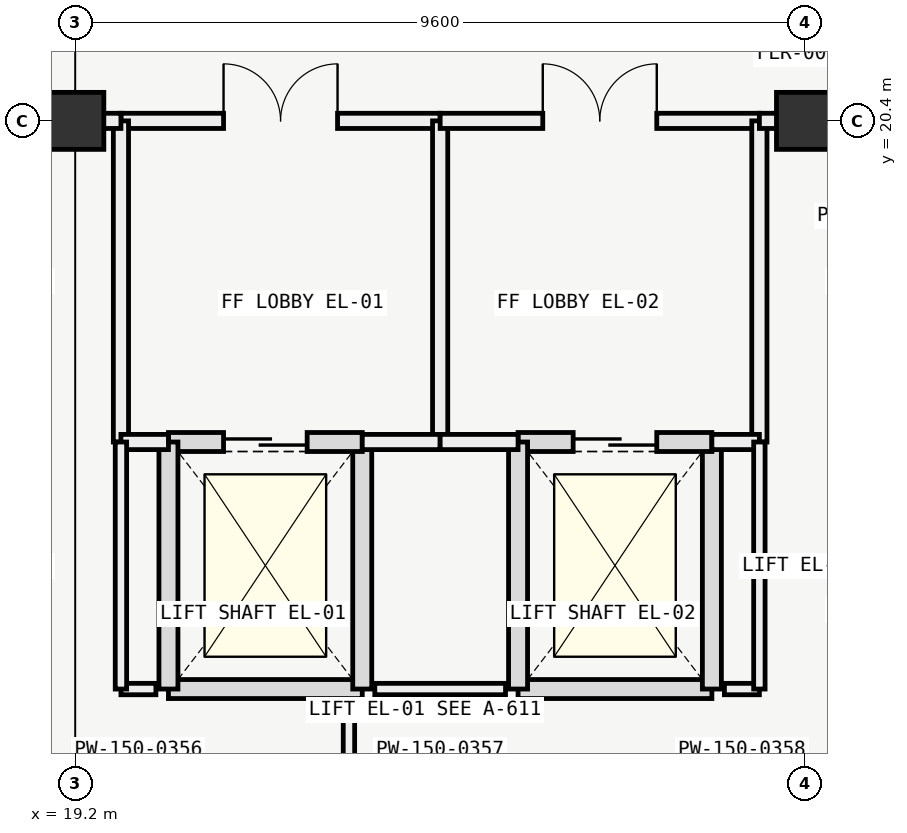
"""IFC4 building model, lengths in metres.
Left out: names, types, materials, properties, quantities, classifications, styles, units other than length and angle.
Written with IfcOpenShell. Run it as: python <this file> out.ifc"""

import sys

from ifc_helpers import new_model, si_unit, direction, frame, frame_2d, origin, origin_2d, place, context, subcontext, project, spatial, rectangle, extrude, element, fill, save


model = new_model("IFC4")
c1 = context("Model", 3, precision=1e-05, world=origin(), true_north=direction((0.0, 1.0)))
c2 = subcontext(c1, "Body", "Model", "MODEL_VIEW")
j1 = project(units=[si_unit("LENGTHUNIT", "METRE"), si_unit("PLANEANGLEUNIT", "RADIAN")], contexts=[c1])
p1 = place(None, origin())
s1 = spatial("IfcSite", under=j1, at=p1, CompositionType="ELEMENT")
p2 = place(p1, origin())
s2 = spatial("IfcBuilding", under=s1, at=p2, CompositionType="ELEMENT")
p3 = place(p2, frame((0.0, 0.0, 5.4)))
s3 = spatial("IfcBuildingStorey", under=s2, at=p3, CompositionType="ELEMENT", Elevation=5.4)
for number, where, z_axis, x_axis in (
    (1, (19.2, 20.4, 0.0), (0.0, 0.0, 1.0), (1.0, 0.0, 0.0)),
    (2, (28.8, 20.4, 0.0), (0.0, 0.0, 1.0), (1.0, 0.0, 0.0)),
):
    element("IfcColumn", number, at=place(p3, frame(where, z_axis=z_axis, x_axis=x_axis)), inside=s3, PredefinedType="COLUMN", context=c2, shape_type="SweptSolid", body=[
        extrude(rectangle(XDim=0.75, YDim=0.75, at=origin_2d()), origin(), (0.0, 0.0, 1.0), 4.2),
    ])
p4 = place(p3, frame((20.425, 12.925, 0.0), z_axis=(0.0, 0.0, 1.0), x_axis=(1.0, 0.0, 0.0)))
e3 = element("IfcWall", 3, at=p4, inside=s3, PredefinedType="SOLIDWALL", context=c2, shape_type="SweptSolid", body=[
    extrude(rectangle(XDim=2.55, YDim=0.25, at=frame_2d((1.275, 0.0))), origin(), (0.0, 0.0, 1.0), 3.92),
])
p5 = place(p3, frame((22.975, 12.925, 0.0), z_axis=(0.0, 0.0, 1.0), x_axis=(0.0, 1.0, 0.0)))
e4 = element("IfcWall", 4, at=p5, inside=s3, PredefinedType="SOLIDWALL", context=c2, shape_type="SweptSolid", body=[
    extrude(rectangle(XDim=3.25, YDim=0.25, at=frame_2d((1.625, 0.0))), origin(), (0.0, 0.0, 1.0), 3.92),
])
p6 = place(p3, frame((22.975, 16.175, 0.0), z_axis=(0.0, 0.0, 1.0), x_axis=(-1.0, 0.0, 0.0)))
e5 = element("IfcWall", 5, at=p6, inside=s3, PredefinedType="SOLIDWALL", context=c2, shape_type="SweptSolid", body=[
    extrude(rectangle(XDim=2.55, YDim=0.25, at=frame_2d((1.275, 0.0))), origin(), (0.0, 0.0, 1.0), 3.92),
])
p7 = place(p6, frame((0.725, 0.0, 0.0)))
e6 = element("IfcOpeningElement", 6, at=p7, cuts=e5, PredefinedType="OPENING", context=c2, shape_type="SweptSolid", body=[
    extrude(rectangle(XDim=1.1, YDim=2.1, at=frame_2d((0.55, 1.05))), frame((0.0, 0.135, 0.0), z_axis=(0.0, -1.0, 0.0), x_axis=(1.0, 0.0, 0.0)), (0.0, 0.0, 1.0), 0.27),
])
p8 = place(p3, frame((20.425, 16.175, 0.0), z_axis=(0.0, 0.0, 1.0), x_axis=(0.0, -1.0, 0.0)))
e7 = element("IfcWall", 7, at=p8, inside=s3, PredefinedType="SOLIDWALL", context=c2, shape_type="SweptSolid", body=[
    extrude(rectangle(XDim=3.25, YDim=0.25, at=frame_2d((1.625, 0.0))), origin(), (0.0, 0.0, 1.0), 3.92),
])
p9 = place(p3, frame((19.8, 20.4, 0.0), z_axis=(0.0, 0.0, 1.0), x_axis=(1.0, 0.0, 0.0)))
e8 = element("IfcWall", 8, at=p9, inside=s3, PredefinedType="PARTITIONING", context=c2, shape_type="SweptSolid", body=[
    extrude(rectangle(XDim=4.2, YDim=0.2, at=frame_2d((2.1, 0.0))), origin(), (0.0, 0.0, 1.0), 3.2),
])
p10 = place(p9, frame((1.35, 0.0, 0.0)))
e9 = element("IfcOpeningElement", 9, at=p10, cuts=e8, PredefinedType="OPENING", context=c2, shape_type="SweptSolid", body=[
    extrude(rectangle(XDim=1.5, YDim=2.2, at=frame_2d((0.75, 1.1))), frame((0.0, 0.11, 0.0), z_axis=(0.0, -1.0, 0.0), x_axis=(1.0, 0.0, 0.0)), (0.0, 0.0, 1.0), 0.22),
])
for number, where, z_axis, x_axis in (
    (10, (19.8, 16.175, 0.0), (0.0, 0.0, 1.0), (0.0, 1.0, 0.0)),
    (11, (24.0, 16.175, 0.0), (0.0, 0.0, 1.0), (0.0, 1.0, 0.0)),
):
    element("IfcWall", number, at=place(p3, frame(where, z_axis=z_axis, x_axis=x_axis)), inside=s3, PredefinedType="PARTITIONING", context=c2, shape_type="SweptSolid", body=[
        extrude(rectangle(XDim=4.225, YDim=0.2, at=frame_2d((2.112, 0.0))), origin(), (0.0, 0.0, 1.0), 3.2),
    ])
p11 = place(p3, frame((19.8, 16.175, 0.0), z_axis=(0.0, 0.0, 1.0), x_axis=(1.0, 0.0, 0.0)))
e12 = element("IfcWall", 12, at=p11, inside=s3, PredefinedType="PARTITIONING", context=c2, shape_type="SweptSolid", body=[
    extrude(rectangle(XDim=0.625, YDim=0.2, at=frame_2d((0.312, 0.0))), origin(), (0.0, 0.0, 1.0), 3.55),
])
p12 = place(p3, frame((22.975, 16.175, 0.0), z_axis=(0.0, 0.0, 1.0), x_axis=(1.0, 0.0, 0.0)))
e13 = element("IfcWall", 13, at=p12, inside=s3, PredefinedType="PARTITIONING", context=c2, shape_type="SweptSolid", body=[
    extrude(rectangle(XDim=1.025, YDim=0.2, at=frame_2d((0.512, 0.0))), origin(), (0.0, 0.0, 1.0), 3.55),
])
p13 = place(p3, frame((25.025, 12.925, 0.0), z_axis=(0.0, 0.0, 1.0), x_axis=(1.0, 0.0, 0.0)))
e14 = element("IfcWall", 14, at=p13, inside=s3, PredefinedType="SOLIDWALL", context=c2, shape_type="SweptSolid", body=[
    extrude(rectangle(XDim=2.55, YDim=0.25, at=frame_2d((1.275, 0.0))), origin(), (0.0, 0.0, 1.0), 3.92),
])
p14 = place(p3, frame((27.575, 12.925, 0.0), z_axis=(0.0, 0.0, 1.0), x_axis=(0.0, 1.0, 0.0)))
e15 = element("IfcWall", 15, at=p14, inside=s3, PredefinedType="SOLIDWALL", context=c2, shape_type="SweptSolid", body=[
    extrude(rectangle(XDim=3.25, YDim=0.25, at=frame_2d((1.625, 0.0))), origin(), (0.0, 0.0, 1.0), 3.92),
])
p15 = place(p3, frame((27.575, 16.175, 0.0), z_axis=(0.0, 0.0, 1.0), x_axis=(-1.0, 0.0, 0.0)))
e16 = element("IfcWall", 16, at=p15, inside=s3, PredefinedType="SOLIDWALL", context=c2, shape_type="SweptSolid", body=[
    extrude(rectangle(XDim=2.55, YDim=0.25, at=frame_2d((1.275, 0.0))), origin(), (0.0, 0.0, 1.0), 3.92),
])
p16 = place(p15, frame((0.725, 0.0, 0.0)))
e17 = element("IfcOpeningElement", 17, at=p16, cuts=e16, PredefinedType="OPENING", context=c2, shape_type="SweptSolid", body=[
    extrude(rectangle(XDim=1.1, YDim=2.1, at=frame_2d((0.55, 1.05))), frame((0.0, 0.135, 0.0), z_axis=(0.0, -1.0, 0.0), x_axis=(1.0, 0.0, 0.0)), (0.0, 0.0, 1.0), 0.27),
])
p17 = place(p3, frame((25.025, 16.175, 0.0), z_axis=(0.0, 0.0, 1.0), x_axis=(0.0, -1.0, 0.0)))
e18 = element("IfcWall", 18, at=p17, inside=s3, PredefinedType="SOLIDWALL", context=c2, shape_type="SweptSolid", body=[
    extrude(rectangle(XDim=3.25, YDim=0.25, at=frame_2d((1.625, 0.0))), origin(), (0.0, 0.0, 1.0), 3.92),
])
p18 = place(p3, frame((24.0, 20.4, 0.0), z_axis=(0.0, 0.0, 1.0), x_axis=(1.0, 0.0, 0.0)))
e19 = element("IfcWall", 19, at=p18, inside=s3, PredefinedType="PARTITIONING", context=c2, shape_type="SweptSolid", body=[
    extrude(rectangle(XDim=4.2, YDim=0.2, at=frame_2d((2.1, 0.0))), origin(), (0.0, 0.0, 1.0), 3.2),
])
p19 = place(p18, frame((1.35, 0.0, 0.0)))
e20 = element("IfcOpeningElement", 20, at=p19, cuts=e19, PredefinedType="OPENING", context=c2, shape_type="SweptSolid", body=[
    extrude(rectangle(XDim=1.5, YDim=2.2, at=frame_2d((0.75, 1.1))), frame((0.0, 0.11, 0.0), z_axis=(0.0, -1.0, 0.0), x_axis=(1.0, 0.0, 0.0)), (0.0, 0.0, 1.0), 0.22),
])
p20 = place(p3, frame((28.2, 16.175, 0.0), z_axis=(0.0, 0.0, 1.0), x_axis=(0.0, 1.0, 0.0)))
e21 = element("IfcWall", 21, at=p20, inside=s3, PredefinedType="PARTITIONING", context=c2, shape_type="SweptSolid", body=[
    extrude(rectangle(XDim=4.225, YDim=0.2, at=frame_2d((2.112, 0.0))), origin(), (0.0, 0.0, 1.0), 3.2),
])
p21 = place(p3, frame((24.0, 16.175, 0.0), z_axis=(0.0, 0.0, 1.0), x_axis=(1.0, 0.0, 0.0)))
e22 = element("IfcWall", 22, at=p21, inside=s3, PredefinedType="PARTITIONING", context=c2, shape_type="SweptSolid", body=[
    extrude(rectangle(XDim=1.025, YDim=0.2, at=frame_2d((0.512, 0.0))), origin(), (0.0, 0.0, 1.0), 3.55),
])
p22 = place(p3, frame((27.575, 16.175, 0.0), z_axis=(0.0, 0.0, 1.0), x_axis=(1.0, 0.0, 0.0)))
e23 = element("IfcWall", 23, at=p22, inside=s3, PredefinedType="PARTITIONING", context=c2, shape_type="SweptSolid", body=[
    extrude(rectangle(XDim=0.625, YDim=0.2, at=frame_2d((0.312, 0.0))), origin(), (0.0, 0.0, 1.0), 3.55),
])
p23 = place(p3, frame((19.8, 12.925, 0.0), z_axis=(0.0, 0.0, 1.0), x_axis=(1.0, 0.0, 0.0)))
e24 = element("IfcWall", 24, at=p23, inside=s3, PredefinedType="PARTITIONING", context=c2, shape_type="SweptSolid", body=[
    extrude(rectangle(XDim=0.46, YDim=0.15, at=frame_2d((0.23, 0.0))), origin(), (0.0, 0.0, 1.0), 3.85),
])
p24 = place(p3, frame((23.14, 12.925, 0.0), z_axis=(0.0, 0.0, 1.0), x_axis=(1.0, 0.0, 0.0)))
e25 = element("IfcWall", 25, at=p24, inside=s3, PredefinedType="PARTITIONING", context=c2, shape_type="SweptSolid", body=[
    extrude(rectangle(XDim=1.72, YDim=0.15, at=frame_2d((0.86, 0.0))), origin(), (0.0, 0.0, 1.0), 3.85),
])
p25 = place(p3, frame((27.74, 12.925, 0.0), z_axis=(0.0, 0.0, 1.0), x_axis=(1.0, 0.0, 0.0)))
e26 = element("IfcWall", 26, at=p25, inside=s3, PredefinedType="PARTITIONING", context=c2, shape_type="SweptSolid", body=[
    extrude(rectangle(XDim=0.46, YDim=0.15, at=frame_2d((0.23, 0.0))), origin(), (0.0, 0.0, 1.0), 3.85),
])
p26 = place(p3, frame((19.8, 12.925, 0.0), z_axis=(0.0, 0.0, 1.0), x_axis=(0.0, 1.0, 0.0)))
e27 = element("IfcWall", 27, at=p26, inside=s3, PredefinedType="PARTITIONING", context=c2, shape_type="SweptSolid", body=[
    extrude(rectangle(XDim=3.25, YDim=0.15, at=frame_2d((1.625, 0.0))), origin(), (0.0, 0.0, 1.0), 3.85),
])
p27 = place(p3, frame((16.89, 20.4, 0.0), z_axis=(0.0, 0.0, 1.0), x_axis=(1.0, 0.0, 0.0)))
e28 = element("IfcWall", 28, at=p27, inside=s3, PredefinedType="PARTITIONING", context=c2, shape_type="SweptSolid", body=[
    extrude(rectangle(XDim=2.91, YDim=0.2, at=frame_2d((1.455, 0.0))), origin(), (0.0, 0.0, 1.0), 3.2),
])
p28 = place(p27, frame((0.885, 0.0, 0.0)))
e29 = element("IfcOpeningElement", 29, at=p28, cuts=e28, PredefinedType="OPENING", context=c2, shape_type="SweptSolid", body=[
    extrude(rectangle(XDim=0.95, YDim=2.1, at=frame_2d((0.475, 1.05))), frame((0.0, 0.11, 0.0), z_axis=(0.0, -1.0, 0.0), x_axis=(1.0, 0.0, 0.0)), (0.0, 0.0, 1.0), 0.22),
])
p29 = place(p3, frame((22.8, 0.15, 0.0), z_axis=(0.0, 0.0, 1.0), x_axis=(0.0, 1.0, 0.0)))
e30 = element("IfcWall", 30, at=p29, inside=s3, PredefinedType="PARTITIONING", context=c2, shape_type="SweptSolid", body=[
    extrude(rectangle(XDim=12.61, YDim=0.15, at=frame_2d((6.305, 0.0))), origin(), (0.0, 0.0, 1.0), 3.2),
])
p30 = place(p3, frame((28.2, 12.925, 0.0), z_axis=(0.0, 0.0, 1.0), x_axis=(0.0, 1.0, 0.0)))
e31 = element("IfcWall", 31, at=p30, inside=s3, PredefinedType="PARTITIONING", context=c2, shape_type="SweptSolid", body=[
    extrude(rectangle(XDim=3.25, YDim=0.15, at=frame_2d((1.625, 0.0))), origin(), (0.0, 0.0, 1.0), 3.85),
])
p31 = place(p3, frame((28.2, 20.4, 0.0), z_axis=(0.0, 0.0, 1.0), x_axis=(1.0, 0.0, 0.0)))
e32 = element("IfcWall", 32, at=p31, inside=s3, PredefinedType="PARTITIONING", context=c2, shape_type="SweptSolid", body=[
    extrude(rectangle(XDim=3.11, YDim=0.2, at=frame_2d((1.555, 0.0))), origin(), (0.0, 0.0, 1.0), 3.2),
])
p32 = place(p31, frame((2.0, 0.0, 0.0)))
e33 = element("IfcOpeningElement", 33, at=p32, cuts=e32, PredefinedType="OPENING", context=c2, shape_type="SweptSolid", body=[
    extrude(rectangle(XDim=0.95, YDim=2.1, at=frame_2d((0.475, 1.05))), frame((0.0, 0.11, 0.0), z_axis=(0.0, -1.0, 0.0), x_axis=(1.0, 0.0, 0.0)), (0.0, 0.0, 1.0), 0.22),
])
p33 = place(p7, origin())
e34 = element("IfcDoor", 34, at=p33, inside=s3, OperationType="SLIDING_TO_LEFT", PredefinedType="DOOR", context=c2, shape_type="SweptSolid", body=[
    extrude(rectangle(XDim=1.1, YDim=2.1, at=frame_2d((0.55, 1.05))), frame((0.0, 0.025, 0.0), z_axis=(0.0, -1.0, 0.0), x_axis=(1.0, 0.0, 0.0)), (0.0, 0.0, 1.0), 0.05),
])
fill(e6, e34)
p34 = place(p10, origin())
e35 = element("IfcDoor", 35, at=p34, inside=s3, OperationType="SINGLE_SWING_LEFT", PredefinedType="DOOR", context=c2, shape_type="SweptSolid", body=[
    extrude(rectangle(XDim=1.5, YDim=2.2, at=frame_2d((0.75, 1.1))), frame((0.0, 0.025, 0.0), z_axis=(0.0, -1.0, 0.0), x_axis=(1.0, 0.0, 0.0)), (0.0, 0.0, 1.0), 0.05),
])
fill(e9, e35)
p35 = place(p16, origin())
e36 = element("IfcDoor", 36, at=p35, inside=s3, OperationType="SLIDING_TO_LEFT", PredefinedType="DOOR", context=c2, shape_type="SweptSolid", body=[
    extrude(rectangle(XDim=1.1, YDim=2.1, at=frame_2d((0.55, 1.05))), frame((0.0, 0.025, 0.0), z_axis=(0.0, -1.0, 0.0), x_axis=(1.0, 0.0, 0.0)), (0.0, 0.0, 1.0), 0.05),
])
fill(e17, e36)
p36 = place(p19, origin())
e37 = element("IfcDoor", 37, at=p36, inside=s3, OperationType="SINGLE_SWING_LEFT", PredefinedType="DOOR", context=c2, shape_type="SweptSolid", body=[
    extrude(rectangle(XDim=1.5, YDim=2.2, at=frame_2d((0.75, 1.1))), frame((0.0, 0.025, 0.0), z_axis=(0.0, -1.0, 0.0), x_axis=(1.0, 0.0, 0.0)), (0.0, 0.0, 1.0), 0.05),
])
fill(e20, e37)
save(model, sys.argv[1])
